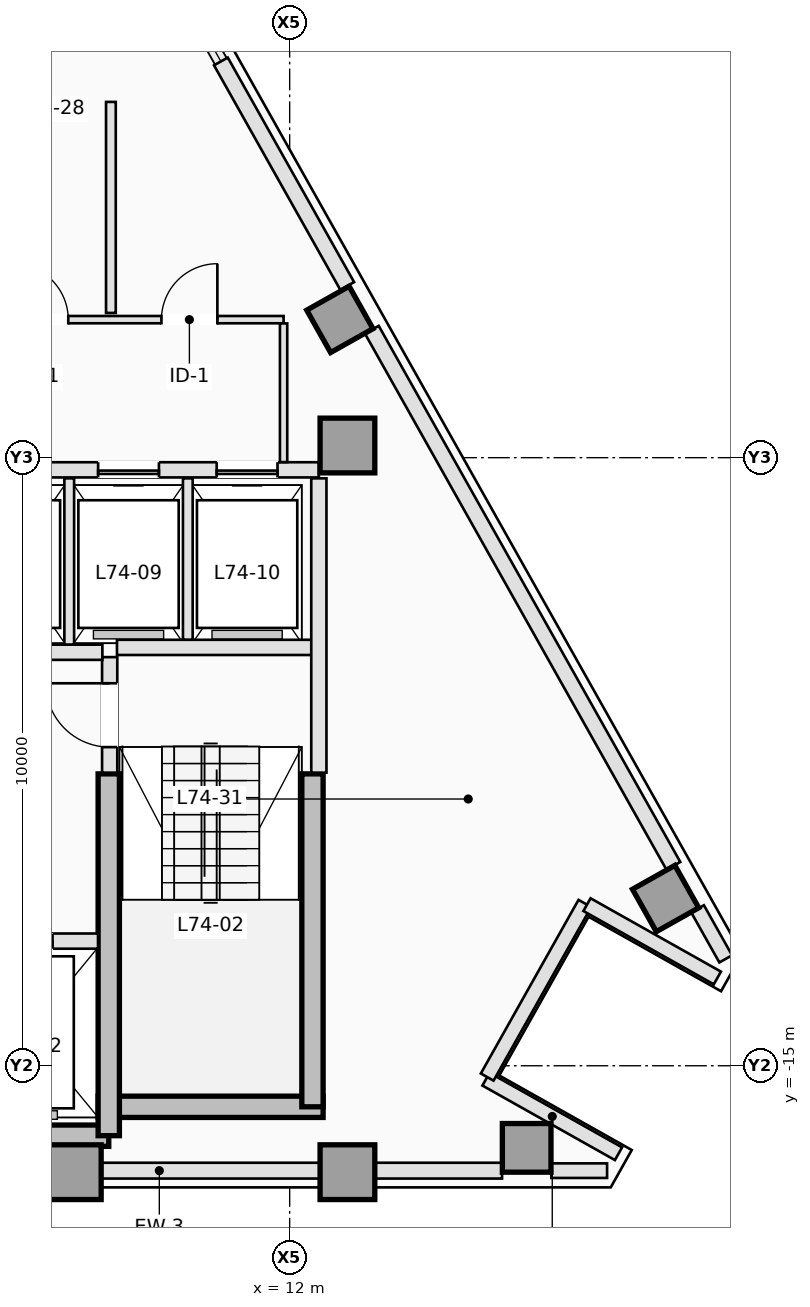
"""IFC4 building model, lengths in metres.
Left out: names, types, materials, properties, quantities, classifications, styles, units other than length and angle.
Written with IfcOpenShell. Run it as: python <this file> out.ifc"""

import sys

from ifc_helpers import new_model, si_unit, direction, frame, frame_2d, origin, origin_2d, place, context, subcontext, project, spatial, rectangle, extrude, element, fill, save


model = new_model("IFC4")
c1 = context("Model", 3, precision=1e-05, world=origin(), true_north=direction((0.0, 1.0)))
c2 = subcontext(c1, "Body", "Model", "MODEL_VIEW")
j1 = project(units=[si_unit("LENGTHUNIT", "METRE"), si_unit("PLANEANGLEUNIT", "RADIAN")], contexts=[c1])
p1 = place(None, origin())
s1 = spatial("IfcSite", under=j1, at=p1, CompositionType="ELEMENT")
p2 = place(p1, origin())
s2 = spatial("IfcBuilding", under=s1, at=p2, CompositionType="ELEMENT")
p3 = place(p2, frame((0.0, 0.0, 267.4)))
s3 = spatial("IfcBuildingStorey", under=s2, at=p3, CompositionType="ELEMENT", Elevation=267.4)
p4 = place(p3, frame((3.75, -16.15, 0.0), z_axis=(0.0, 0.0, 1.0), x_axis=(1.0, 0.0, 0.0)))
e1 = element("IfcWall", 1, at=p4, inside=s3, PredefinedType="SHEAR", context=c2, shape_type="SweptSolid", body=[
    extrude(rectangle(XDim=5.275, YDim=0.35, at=frame_2d((2.637, 0.0))), origin(), (0.0, 0.0, 1.0), 3.5),
])
p5 = place(p3, frame((8.85, -15.675, 0.0), z_axis=(0.0, 0.0, 1.0), x_axis=(1.0, 0.0, 0.0)))
e2 = element("IfcWall", 2, at=p5, inside=s3, PredefinedType="SHEAR", context=c2, shape_type="SweptSolid", body=[
    extrude(rectangle(XDim=3.7, YDim=0.35, at=frame_2d((1.85, 0.0))), origin(), (0.0, 0.0, 1.0), 3.5),
])
p6 = place(p3, frame((12.375, -15.675, 0.0), z_axis=(0.0, 0.0, 1.0), x_axis=(0.0, 1.0, 0.0)))
e3 = element("IfcWall", 3, at=p6, inside=s3, PredefinedType="SHEAR", context=c2, shape_type="SweptSolid", body=[
    extrude(rectangle(XDim=5.475, YDim=0.35, at=frame_2d((2.738, 0.0))), origin(), (0.0, 0.0, 1.0), 3.5),
])
p7 = place(p3, frame((9.025, -16.15, 0.0), z_axis=(0.0, 0.0, 1.0), x_axis=(0.0, 1.0, 0.0)))
e4 = element("IfcWall", 4, at=p7, inside=s3, PredefinedType="SHEAR", context=c2, shape_type="SweptSolid", body=[
    extrude(rectangle(XDim=5.95, YDim=0.35, at=frame_2d((2.975, 0.0))), origin(), (0.0, 0.0, 1.0), 3.5),
])
for number, where, z_axis, x_axis in (
    (5, (8.45, -16.75, 0.0), (0.0, 0.0, 1.0), (1.0, 0.0, 0.0)),
    (6, (12.95, -16.75, 0.0), (0.0, 0.0, 1.0), (1.0, 0.0, 0.0)),
    (7, (12.95, -4.8, 0.0), (0.0, 0.0, 1.0), (1.0, 0.0, 0.0)),
):
    element("IfcColumn", number, at=place(p3, frame(where, z_axis=z_axis, x_axis=x_axis)), inside=s3, PredefinedType="COLUMN", context=c2, shape_type="SweptSolid", body=[
        extrude(rectangle(XDim=0.9, YDim=0.9, at=origin_2d()), origin(), (0.0, 0.0, 1.0), 3.5),
    ])
for number, where, z_axis, x_axis in (
    (8, (15.898, -16.35, 0.0), (0.0, 0.0, 1.0), (0.0, 1.0, 0.0)),
    (9, (18.182, -12.25, 0.0), (0.0, 0.0, 1.0), (0.872, 0.49, 0.0)),
    (10, (12.825, -2.727, 0.0), (0.0, 0.0, 1.0), (0.872, 0.49, 0.0)),
):
    element("IfcColumn", number, at=place(p3, frame(where, z_axis=z_axis, x_axis=x_axis)), inside=s3, PredefinedType="COLUMN", context=c2, shape_type="SweptSolid", body=[
        extrude(rectangle(XDim=0.8, YDim=0.8, at=origin_2d()), origin(), (0.0, 0.0, 1.0), 3.5),
    ])
p8 = place(p3, frame((17.22, -16.725, 0.0), z_axis=(0.0, 0.0, 1.0), x_axis=(-1.0, 0.0, 0.0)))
e11 = element("IfcWall", 11, at=p8, inside=s3, PredefinedType="STANDARD", context=c2, shape_type="SweptSolid", body=[
    extrude(rectangle(XDim=0.917, YDim=0.24, at=frame_2d((0.459, 0.0))), origin(), (0.0, 0.0, 1.0), 3.18),
])
p9 = place(p3, frame((15.493, -16.725, 0.0), z_axis=(0.0, 0.0, 1.0), x_axis=(-1.0, 0.0, 0.0)))
e12 = element("IfcWall", 12, at=p9, inside=s3, PredefinedType="STANDARD", context=c2, shape_type="SweptSolid", body=[
    extrude(rectangle(XDim=11.273, YDim=0.26, at=frame_2d((5.636, 0.0))), origin(), (0.0, 0.0, 1.0), 2.72),
])
p10 = place(p3, frame((18.708, -12.419, 0.0), z_axis=(0.0, 0.0, 1.0), x_axis=(0.490199895283, -0.871610040479, 0.0)))
e13 = element("IfcWall", 13, at=p10, inside=s3, PredefinedType="STANDARD", context=c2, shape_type="SweptSolid", body=[
    extrude(rectangle(XDim=0.945, YDim=0.24, at=frame_2d((0.472, 0.0))), origin(), (0.0, 0.0, 1.0), 3.18),
])
p11 = place(p3, frame((13.351, -2.896, 0.0), z_axis=(0.0, 0.0, 1.0), x_axis=(0.490266968583, -0.871572314565, 0.0)))
e14 = element("IfcWall", 14, at=p11, inside=s3, PredefinedType="STANDARD", context=c2, shape_type="SweptSolid", body=[
    extrude(rectangle(XDim=10.116, YDim=0.26, at=frame_2d((5.058, 0.0))), origin(), (0.0, 0.0, 1.0), 3.18),
])
p12 = place(p3, frame((10.869, 1.516, 0.0), z_axis=(0.0, 0.0, 1.0), x_axis=(0.490244825075, -0.871584770109, 0.0)))
e15 = element("IfcWall", 15, at=p12, inside=s3, PredefinedType="STANDARD", context=c2, shape_type="SweptSolid", body=[
    extrude(rectangle(XDim=4.237, YDim=0.26, at=frame_2d((2.119, 0.0))), origin(), (0.0, 0.0, 1.0), 3.18),
])
p13 = place(p3, frame((17.408, -16.447, 0.0), z_axis=(0.0, 0.0, 1.0), x_axis=(-0.871588577066, 0.490238056792, 0.0)))
e16 = element("IfcWall", 16, at=p13, inside=s3, PredefinedType="STANDARD", context=c2, shape_type="SweptSolid", body=[
    extrude(rectangle(XDim=2.5, YDim=0.24, at=frame_2d((1.25, 0.0))), origin(), (0.0, 0.0, 1.0), 3.18),
])
p14 = place(p3, frame((15.248, -15.186, 0.0), z_axis=(0.0, 0.0, 1.0), x_axis=(0.490293083368, 0.871557624258, 0.0)))
e17 = element("IfcWall", 17, at=p14, inside=s3, PredefinedType="STANDARD", context=c2, shape_type="SweptSolid", body=[
    extrude(rectangle(XDim=3.276, YDim=0.24, at=frame_2d((1.638, 0.0))), origin(), (0.0, 0.0, 1.0), 2.72),
])
p15 = place(p3, frame((16.889, -12.35, 0.0), z_axis=(0.0, 0.0, 1.0), x_axis=(0.87157023615, -0.490270663468, 0.0)))
e18 = element("IfcWall", 18, at=p15, inside=s3, PredefinedType="STANDARD", context=c2, shape_type="SweptSolid", body=[
    extrude(rectangle(XDim=2.46, YDim=0.24, at=frame_2d((1.23, 0.0))), origin(), (0.0, 0.0, 1.0), 3.18),
])
p16 = place(p3, frame((9.04, -10.18, 0.0), z_axis=(0.0, 0.0, 1.0), x_axis=(0.0, 1.0, 0.0)))
e19 = element("IfcWall", 19, at=p16, inside=s3, PredefinedType="PARTITIONING", context=c2, shape_type="SweptSolid", body=[
    extrude(rectangle(XDim=1.9, YDim=0.25, at=frame_2d((0.95, 0.0))), origin(), (0.0, 0.0, 1.0), 3.18),
])
p17 = place(p16, frame((0.42, 0.0, 0.0)))
e20 = element("IfcOpeningElement", 20, at=p17, cuts=e19, PredefinedType="OPENING", context=c2, shape_type="SweptSolid", body=[
    extrude(rectangle(XDim=1.05, YDim=2.15, at=frame_2d((0.525, 1.075))), frame((0.0, 0.135, 0.0), z_axis=(0.0, -1.0, 0.0), x_axis=(1.0, 0.0, 0.0)), (0.0, 0.0, 1.0), 0.27),
])
p18 = place(p3, frame((9.16, -8.12, 0.0), z_axis=(0.0, 0.0, 1.0), x_axis=(1.0, 0.0, 0.0)))
e21 = element("IfcWall", 21, at=p18, inside=s3, PredefinedType="PARTITIONING", context=c2, shape_type="SweptSolid", body=[
    extrude(rectangle(XDim=3.22, YDim=0.25, at=frame_2d((1.61, 0.0))), origin(), (0.0, 0.0, 1.0), 3.18),
])
p19 = place(p3, frame((12.48, -10.18, 0.0), z_axis=(0.0, 0.0, 1.0), x_axis=(0.0, 1.0, 0.0)))
e22 = element("IfcWall", 22, at=p19, inside=s3, PredefinedType="PARTITIONING", context=c2, shape_type="SweptSolid", body=[
    extrude(rectangle(XDim=4.84, YDim=0.25, at=frame_2d((2.42, 0.0))), origin(), (0.0, 0.0, 1.0), 3.18),
])
p20 = place(p3, frame((3.68, -12.95, 0.0), z_axis=(0.0, 0.0, 1.0), x_axis=(1.0, 0.0, 0.0)))
e23 = element("IfcWall", 23, at=p20, inside=s3, PredefinedType="PARTITIONING", context=c2, shape_type="SweptSolid", body=[
    extrude(rectangle(XDim=5.168, YDim=0.25, at=frame_2d((2.584, 0.0))), origin(), (0.0, 0.0, 1.0), 3.18),
])
p21 = place(p20, frame((3.32, 0.0, 0.0)))
e24 = element("IfcOpeningElement", 24, at=p21, cuts=e23, PredefinedType="OPENING", context=c2, shape_type="SweptSolid", body=[
    extrude(rectangle(XDim=1.1, YDim=2.15, at=frame_2d((0.55, 1.075))), frame((0.0, 0.135, 0.0), z_axis=(0.0, -1.0, 0.0), x_axis=(1.0, 0.0, 0.0)), (0.0, 0.0, 1.0), 0.27),
])
p22 = place(p20, frame((0.67, 0.0, 0.0)))
e25 = element("IfcOpeningElement", 25, at=p22, cuts=e23, PredefinedType="OPENING", context=c2, shape_type="SweptSolid", body=[
    extrude(rectangle(XDim=1.2, YDim=2.15, at=frame_2d((0.6, 1.075))), frame((0.0, 0.135, 0.0), z_axis=(0.0, -1.0, 0.0), x_axis=(1.0, 0.0, 0.0)), (0.0, 0.0, 1.0), 0.27),
])
p23 = place(p3, frame((3.68, -8.2, 0.0), z_axis=(0.0, 0.0, 1.0), x_axis=(1.0, 0.0, 0.0)))
e26 = element("IfcWall", 26, at=p23, inside=s3, PredefinedType="PARTITIONING", context=c2, shape_type="SweptSolid", body=[
    extrude(rectangle(XDim=5.24, YDim=0.25, at=frame_2d((2.62, 0.0))), origin(), (0.0, 0.0, 1.0), 3.18),
])
p24 = place(p3, frame((4.202, -5.2, 0.0), z_axis=(0.0, 0.0, 1.0), x_axis=(1.0, 0.0, 0.0)))
e27 = element("IfcWall", 27, at=p24, inside=s3, PredefinedType="PARTITIONING", context=c2, shape_type="SweptSolid", body=[
    extrude(rectangle(XDim=8.278, YDim=0.25, at=frame_2d((4.139, 0.0))), origin(), (0.0, 0.0, 1.0), 3.18),
])
p25 = place(p24, frame((0.748, 0.0, 0.0)))
e28 = element("IfcOpeningElement", 28, at=p25, cuts=e27, PredefinedType="OPENING", context=c2, shape_type="SweptSolid", body=[
    extrude(rectangle(XDim=1.0, YDim=2.15, at=frame_2d((0.5, 1.075))), frame((0.0, 0.135, 0.0), z_axis=(0.0, -1.0, 0.0), x_axis=(1.0, 0.0, 0.0)), (0.0, 0.0, 1.0), 0.27),
])
p26 = place(p24, frame((2.698, 0.0, 0.0)))
e29 = element("IfcOpeningElement", 29, at=p26, cuts=e27, PredefinedType="OPENING", context=c2, shape_type="SweptSolid", body=[
    extrude(rectangle(XDim=1.0, YDim=2.15, at=frame_2d((0.5, 1.075))), frame((0.0, 0.135, 0.0), z_axis=(0.0, -1.0, 0.0), x_axis=(1.0, 0.0, 0.0)), (0.0, 0.0, 1.0), 0.27),
])
p27 = place(p24, frame((4.648, 0.0, 0.0)))
e30 = element("IfcOpeningElement", 30, at=p27, cuts=e27, PredefinedType="OPENING", context=c2, shape_type="SweptSolid", body=[
    extrude(rectangle(XDim=1.0, YDim=2.15, at=frame_2d((0.5, 1.075))), frame((0.0, 0.135, 0.0), z_axis=(0.0, -1.0, 0.0), x_axis=(1.0, 0.0, 0.0)), (0.0, 0.0, 1.0), 0.27),
])
p28 = place(p24, frame((6.598, 0.0, 0.0)))
e31 = element("IfcOpeningElement", 31, at=p28, cuts=e27, PredefinedType="OPENING", context=c2, shape_type="SweptSolid", body=[
    extrude(rectangle(XDim=1.0, YDim=2.15, at=frame_2d((0.5, 1.075))), frame((0.0, 0.135, 0.0), z_axis=(0.0, -1.0, 0.0), x_axis=(1.0, 0.0, 0.0)), (0.0, 0.0, 1.0), 0.27),
])
p29 = place(p3, frame((8.375, -8.073, 0.0), z_axis=(0.0, 0.0, 1.0), x_axis=(0.0, 1.0, 0.0)))
e32 = element("IfcWall", 32, at=p29, inside=s3, PredefinedType="PARTITIONING", context=c2, shape_type="SweptSolid", body=[
    extrude(rectangle(XDim=2.733, YDim=0.16, at=frame_2d((1.366, 0.0))), origin(), (0.0, 0.0, 1.0), 3.18),
])
p30 = place(p3, frame((10.325, -7.993, 0.0), z_axis=(0.0, 0.0, 1.0), x_axis=(0.0, 1.0, 0.0)))
e33 = element("IfcWall", 33, at=p30, inside=s3, PredefinedType="PARTITIONING", context=c2, shape_type="SweptSolid", body=[
    extrude(rectangle(XDim=2.653, YDim=0.16, at=frame_2d((1.326, 0.0))), origin(), (0.0, 0.0, 1.0), 3.18),
])
p31 = place(p3, frame((6.572, -2.73, 0.0), z_axis=(0.0, 0.0, 1.0), x_axis=(1.0, 0.0, 0.0)))
e34 = element("IfcWall", 34, at=p31, inside=s3, PredefinedType="PARTITIONING", context=c2, shape_type="SweptSolid", body=[
    extrude(rectangle(XDim=5.328, YDim=0.12, at=frame_2d((2.664, 0.0))), origin(), (0.0, 0.0, 1.0), 3.18),
])
p32 = place(p31, frame((0.867, 0.0, 0.0)))
e35 = element("IfcOpeningElement", 35, at=p32, cuts=e34, PredefinedType="OPENING", context=c2, shape_type="SweptSolid", body=[
    extrude(rectangle(XDim=0.92, YDim=2.12, at=frame_2d((0.46, 1.06))), frame((0.0, 0.07, 0.0), z_axis=(0.0, -1.0, 0.0), x_axis=(1.0, 0.0, 0.0)), (0.0, 0.0, 1.0), 0.14),
])
p33 = place(p31, frame((3.319, 0.0, 0.0)))
e36 = element("IfcOpeningElement", 36, at=p33, cuts=e34, PredefinedType="OPENING", context=c2, shape_type="SweptSolid", body=[
    extrude(rectangle(XDim=0.92, YDim=2.12, at=frame_2d((0.46, 1.06))), frame((0.0, 0.07, 0.0), z_axis=(0.0, -1.0, 0.0), x_axis=(1.0, 0.0, 0.0)), (0.0, 0.0, 1.0), 0.14),
])
p34 = place(p3, frame((11.9, -2.792, 0.0), z_axis=(0.0, 0.0, 1.0), x_axis=(0.0, -1.0, 0.0)))
e37 = element("IfcWall", 37, at=p34, inside=s3, PredefinedType="PARTITIONING", context=c2, shape_type="SweptSolid", body=[
    extrude(rectangle(XDim=2.281, YDim=0.12, at=frame_2d((1.141, 0.0))), origin(), (0.0, 0.0, 1.0), 3.18),
])
p35 = place(p3, frame((9.06, 0.85, 0.0), z_axis=(0.0, 0.0, 1.0), x_axis=(0.0, -1.0, 0.0)))
e38 = element("IfcWall", 38, at=p35, inside=s3, PredefinedType="PARTITIONING", context=c2, shape_type="SweptSolid", body=[
    extrude(rectangle(XDim=3.47, YDim=0.16, at=frame_2d((1.735, 0.0))), origin(), (0.0, 0.0, 1.0), 3.18),
])
p36 = place(p27, origin())
e39 = element("IfcDoor", 39, at=p36, inside=s3, OperationType="SLIDING_TO_RIGHT", PredefinedType="DOOR", context=c2, shape_type="SweptSolid", body=[
    extrude(rectangle(XDim=1.0, YDim=2.15, at=frame_2d((0.5, 1.075))), frame((0.0, 0.025, 0.0), z_axis=(0.0, -1.0, 0.0), x_axis=(1.0, 0.0, 0.0)), (0.0, 0.0, 1.0), 0.05),
])
fill(e30, e39)
p37 = place(p28, origin())
e40 = element("IfcDoor", 40, at=p37, inside=s3, OperationType="SLIDING_TO_RIGHT", PredefinedType="DOOR", context=c2, shape_type="SweptSolid", body=[
    extrude(rectangle(XDim=1.0, YDim=2.15, at=frame_2d((0.5, 1.075))), frame((0.0, 0.025, 0.0), z_axis=(0.0, -1.0, 0.0), x_axis=(1.0, 0.0, 0.0)), (0.0, 0.0, 1.0), 0.05),
])
fill(e31, e40)
p38 = place(p17, origin())
e41 = element("IfcDoor", 41, at=p38, inside=s3, OperationType="SINGLE_SWING_RIGHT", PredefinedType="DOOR", context=c2, shape_type="SweptSolid", body=[
    extrude(rectangle(XDim=1.05, YDim=2.15, at=frame_2d((0.525, 1.075))), frame((0.0, 0.025, 0.0), z_axis=(0.0, -1.0, 0.0), x_axis=(1.0, 0.0, 0.0)), (0.0, 0.0, 1.0), 0.05),
])
fill(e20, e41)
p39 = place(p32, origin())
e42 = element("IfcDoor", 42, at=p39, inside=s3, OperationType="SINGLE_SWING_LEFT", PredefinedType="DOOR", context=c2, shape_type="SweptSolid", body=[
    extrude(rectangle(XDim=0.92, YDim=2.12, at=frame_2d((0.46, 1.06))), frame((0.0, 0.025, 0.0), z_axis=(0.0, -1.0, 0.0), x_axis=(1.0, 0.0, 0.0)), (0.0, 0.0, 1.0), 0.05),
])
fill(e35, e42)
p40 = place(p33, origin())
e43 = element("IfcDoor", 43, at=p40, inside=s3, OperationType="SINGLE_SWING_RIGHT", PredefinedType="DOOR", context=c2, shape_type="SweptSolid", body=[
    extrude(rectangle(XDim=0.92, YDim=2.12, at=frame_2d((0.46, 1.06))), frame((0.0, 0.025, 0.0), z_axis=(0.0, -1.0, 0.0), x_axis=(1.0, 0.0, 0.0)), (0.0, 0.0, 1.0), 0.05),
])
fill(e36, e43)
save(model, sys.argv[1])
